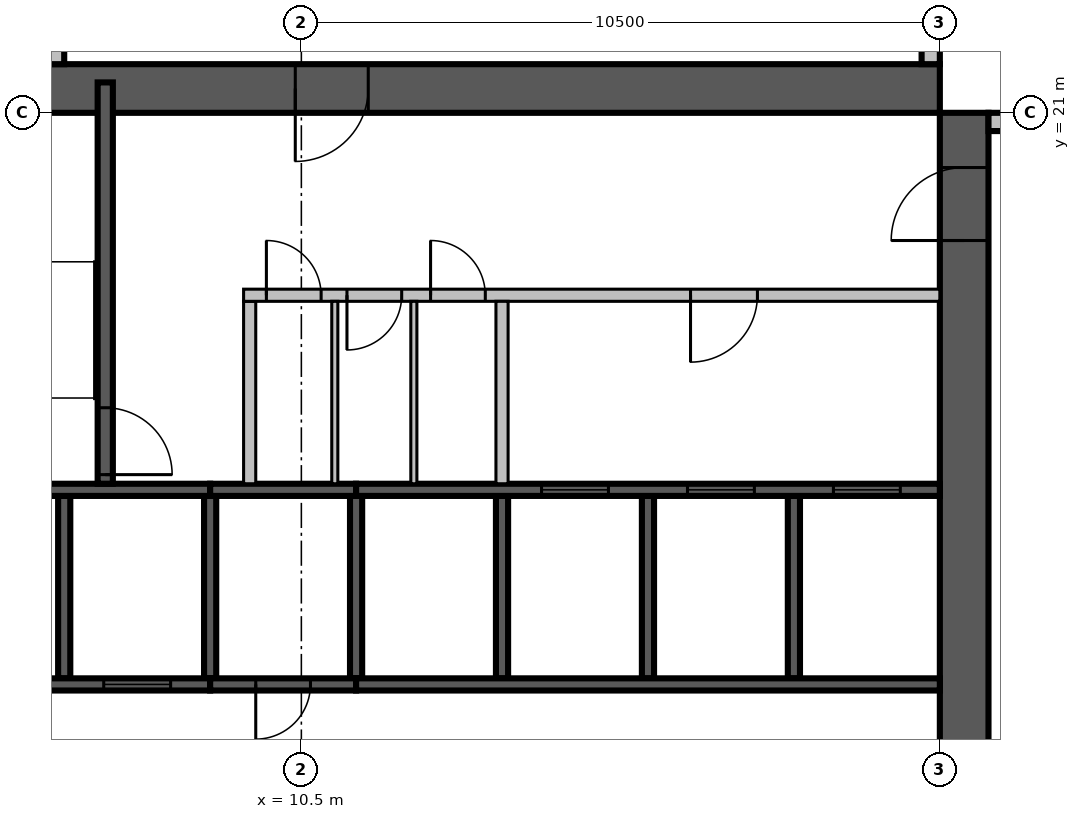
"""IFC4 building model, lengths in metres.
Left out: names, types, materials, properties, quantities, classifications, styles, units other than length and angle.
Written with IfcOpenShell. Run it as: python <this file> out.ifc"""

import sys

from ifc_helpers import new_model, si_unit, direction, frame, frame_2d, origin, place, context, subcontext, project, spatial, rectangle, extrude, source, transform, mapped, element, fill, save


model = new_model("IFC4")
c1 = context("Model", 3, precision=1e-05, world=origin(), true_north=direction((0.0, 1.0)))
c2 = subcontext(c1, "Body", "Model", "MODEL_VIEW")
j1 = project(units=[si_unit("LENGTHUNIT", "METRE"), si_unit("PLANEANGLEUNIT", "RADIAN")], contexts=[c1])
p1 = place(None, origin())
s1 = spatial("IfcSite", under=j1, at=p1, CompositionType="ELEMENT")
p2 = place(p1, origin())
s2 = spatial("IfcBuilding", under=s1, at=p2, CompositionType="ELEMENT")
p3 = place(p2, frame((0.0, 0.0, 215.8)))
s3 = spatial("IfcBuildingStorey", under=s2, at=p3, CompositionType="ELEMENT", Elevation=215.8)
m1 = source(origin(), c2, "Body", "SweptSolid", [
    extrude(rectangle(XDim=16.8, YDim=0.8, at=frame_2d((8.4, 0.0))), origin(), (0.0, 0.0, 1.0), 3.8),
])
p4 = place(p3, frame((21.4, 4.2, 0.0), z_axis=(0.0, 0.0, 1.0), x_axis=(0.0, 1.0, 0.0)))
e1 = element("IfcWall", 1, at=p4, inside=s3, PredefinedType="SHEAR", context=c2, shape_type="MappedRepresentation", body=[
    mapped(m1, transform((0.0, 0.0, 0.0), scale=1.0)),
])
m2 = source(origin(), c2, "Body", "SweptSolid", [
    extrude(rectangle(XDim=2.2, YDim=2.1, at=frame_2d((1.1, 1.05))), frame((0.0, 0.41, 0.0), z_axis=(0.0, -1.0, 0.0), x_axis=(1.0, 0.0, 0.0)), (0.0, 0.0, 1.0), 0.82),
])
p5 = place(p4, frame((4.2, 0.0, 0.0)))
e2 = element("IfcOpeningElement", 2, at=p5, cuts=e1, PredefinedType="OPENING", context=c2, shape_type="MappedRepresentation", body=[
    mapped(m2, transform((0.0, 0.0, 0.0), scale=1.0)),
])
m3 = source(origin(), c2, "Body", "SweptSolid", [
    extrude(rectangle(XDim=1.2, YDim=2.1, at=frame_2d((0.6, 1.05))), frame((0.0, 0.41, 0.0), z_axis=(0.0, -1.0, 0.0), x_axis=(1.0, 0.0, 0.0)), (0.0, 0.0, 1.0), 0.82),
])
p6 = place(p4, frame((14.7, 0.0, 0.0)))
e3 = element("IfcOpeningElement", 3, at=p6, cuts=e1, PredefinedType="OPENING", context=c2, shape_type="MappedRepresentation", body=[
    mapped(m3, transform((0.0, 0.0, 0.0), scale=1.0)),
])
p7 = place(p3, frame((4.2, 21.4, 0.0), z_axis=(0.0, 0.0, 1.0), x_axis=(1.0, 0.0, 0.0)))
e4 = element("IfcWall", 4, at=p7, inside=s3, PredefinedType="SHEAR", context=c2, shape_type="MappedRepresentation", body=[
    mapped(m1, transform((0.0, 0.0, 0.0), scale=1.0)),
])
p8 = place(p7, frame((6.2, 0.0, 0.0)))
e5 = element("IfcOpeningElement", 5, at=p8, cuts=e4, PredefinedType="OPENING", context=c2, shape_type="MappedRepresentation", body=[
    mapped(m3, transform((0.0, 0.0, 0.0), scale=1.0)),
])
m4 = source(origin(), c2, "Body", "SweptSolid", [
    extrude(rectangle(XDim=7.15, YDim=0.3, at=frame_2d((3.575, 0.0))), origin(), (0.0, 0.0, 1.0), 3.4),
])
p9 = place(p3, frame((28.95, 20.85, 0.0), z_axis=(0.0, 0.0, 1.0), x_axis=(-1.0, 0.0, 0.0)))
e6 = element("IfcWall", 6, at=p9, inside=s3, PredefinedType="STANDARD", context=c2, shape_type="MappedRepresentation", body=[
    mapped(m4, transform((0.0, 0.0, 0.0), scale=1.0)),
])
m5 = source(origin(), c2, "Body", "SweptSolid", [
    extrude(rectangle(XDim=3.0, YDim=2.3, at=frame_2d((1.5, 1.15))), frame((0.0, 0.16, 0.0), z_axis=(0.0, -1.0, 0.0), x_axis=(1.0, 0.0, 0.0)), (0.0, 0.0, 1.0), 0.32),
])
p10 = place(p9, frame((0.15, 0.0, 0.6)))
e7 = element("IfcOpeningElement", 7, at=p10, cuts=e6, PredefinedType="OPENING", context=c2, shape_type="MappedRepresentation", body=[
    mapped(m5, transform((0.0, 0.0, 0.0), scale=1.0)),
])
m6 = source(origin(), c2, "Body", "SweptSolid", [
    extrude(rectangle(XDim=1.8, YDim=2.3, at=frame_2d((0.9, 1.15))), frame((0.0, 0.16, 0.0), z_axis=(0.0, -1.0, 0.0), x_axis=(1.0, 0.0, 0.0)), (0.0, 0.0, 1.0), 0.32),
])
p11 = place(p9, frame((4.95, 0.0, 0.6)))
e8 = element("IfcOpeningElement", 8, at=p11, cuts=e6, PredefinedType="OPENING", context=c2, shape_type="MappedRepresentation", body=[
    mapped(m6, transform((0.0, 0.0, 0.0), scale=1.0)),
])
p12 = place(p3, frame((20.85, 21.8, 0.0), z_axis=(0.0, 0.0, 1.0), x_axis=(0.0, 1.0, 0.0)))
e9 = element("IfcWall", 9, at=p12, inside=s3, PredefinedType="STANDARD", context=c2, shape_type="MappedRepresentation", body=[
    mapped(m4, transform((0.0, 0.0, 0.0), scale=1.0)),
])
p13 = place(p12, frame((0.4, 0.0, 0.6)))
e10 = element("IfcOpeningElement", 10, at=p13, cuts=e9, PredefinedType="OPENING", context=c2, shape_type="MappedRepresentation", body=[
    mapped(m6, transform((0.0, 0.0, 0.0), scale=1.0)),
])
m7 = source(origin(), c2, "Body", "SweptSolid", [
    extrude(rectangle(XDim=1.0, YDim=2.1, at=frame_2d((0.5, 1.05))), frame((0.0, 0.16, 0.0), z_axis=(0.0, -1.0, 0.0), x_axis=(1.0, 0.0, 0.0)), (0.0, 0.0, 1.0), 0.32),
])
p14 = place(p12, frame((5.0, 0.0, 0.0)))
e11 = element("IfcOpeningElement", 11, at=p14, cuts=e9, PredefinedType="OPENING", context=c2, shape_type="MappedRepresentation", body=[
    mapped(m7, transform((0.0, 0.0, 0.0), scale=1.0)),
])
m8 = source(origin(), c2, "Body", "SweptSolid", [
    extrude(rectangle(XDim=16.6, YDim=0.3, at=frame_2d((8.3, 0.0))), origin(), (0.0, 0.0, 1.0), 2.9),
])
p15 = place(p3, frame((6.45, 38.4, 0.0), z_axis=(0.0, 0.0, 1.0), x_axis=(0.0, -1.0, 0.0)))
e12 = element("IfcWall", 12, at=p15, inside=s3, PredefinedType="STANDARD", context=c2, shape_type="MappedRepresentation", body=[
    mapped(m8, transform((0.0, 0.0, 0.0), scale=1.0)),
])
p16 = place(p15, frame((1.15, 0.0, 0.6)))
e13 = element("IfcOpeningElement", 13, at=p16, cuts=e12, PredefinedType="OPENING", context=c2, shape_type="MappedRepresentation", body=[
    mapped(m6, transform((0.0, 0.0, 0.0), scale=1.0)),
])
p17 = place(p15, frame((5.162, 0.0, 0.6)))
e14 = element("IfcOpeningElement", 14, at=p17, cuts=e12, PredefinedType="OPENING", context=c2, shape_type="MappedRepresentation", body=[
    mapped(m6, transform((0.0, 0.0, 0.0), scale=1.0)),
])
p18 = place(p15, frame((9.438, 0.0, 0.6)))
e15 = element("IfcOpeningElement", 15, at=p18, cuts=e12, PredefinedType="OPENING", context=c2, shape_type="MappedRepresentation", body=[
    mapped(m6, transform((0.0, 0.0, 0.0), scale=1.0)),
])
m9 = source(origin(), c2, "Body", "SweptSolid", [
    extrude(rectangle(XDim=1.2, YDim=2.3, at=frame_2d((0.6, 1.15))), frame((0.0, 0.16, 0.0), z_axis=(0.0, -1.0, 0.0), x_axis=(1.0, 0.0, 0.0)), (0.0, 0.0, 1.0), 0.32),
])
p19 = place(p15, frame((14.338, 0.0, 0.6)))
e16 = element("IfcOpeningElement", 16, at=p19, cuts=e12, PredefinedType="OPENING", context=c2, shape_type="MappedRepresentation", body=[
    mapped(m9, transform((0.0, 0.0, 0.0), scale=1.0)),
])
p20 = place(p15, frame((11.887, 0.0, 0.6)))
e17 = element("IfcOpeningElement", 17, at=p20, cuts=e12, PredefinedType="OPENING", context=c2, shape_type="MappedRepresentation", body=[
    mapped(m6, transform((0.0, 0.0, 0.0), scale=1.0)),
])
m10 = source(origin(), c2, "Body", "SweptSolid", [
    extrude(rectangle(XDim=3.0, YDim=0.2, at=frame_2d((1.5, 0.0))), origin(), (0.0, 0.0, 1.0), 3.8),
])
p21 = place(p3, frame((6.6, 11.7, 0.0), z_axis=(0.0, 0.0, 1.0), x_axis=(0.0, 1.0, 0.0)))
e18 = element("IfcWall", 18, at=p21, inside=s3, PredefinedType="SOLIDWALL", context=c2, shape_type="MappedRepresentation", body=[
    mapped(m10, transform((0.0, 0.0, 0.0), scale=1.0)),
])
m11 = source(origin(), c2, "Body", "SweptSolid", [
    extrude(rectangle(XDim=3.0, YDim=0.2, at=frame_2d((1.5, 0.0))), origin(), (0.0, 0.0, 1.0), 3.4),
])
for number, where, z_axis, x_axis in (
    (19, (9.0, 11.7, 0.0), (0.0, 0.0, 1.0), (0.0, 1.0, 0.0)),
    (20, (11.4, 11.7, 0.0), (0.0, 0.0, 1.0), (0.0, 1.0, 0.0)),
):
    element("IfcWall", number, at=place(p3, frame(where, z_axis=z_axis, x_axis=x_axis)), inside=s3, PredefinedType="SOLIDWALL", context=c2, shape_type="MappedRepresentation", body=[
        mapped(m11, transform((0.0, 0.0, 0.0), scale=1.0)),
    ])
for number, where, z_axis, x_axis in (
    (21, (13.8, 11.7, 0.0), (0.0, 0.0, 1.0), (0.0, 1.0, 0.0)),
    (22, (16.2, 11.7, 0.0), (0.0, 0.0, 1.0), (0.0, 1.0, 0.0)),
    (23, (18.6, 11.7, 0.0), (0.0, 0.0, 1.0), (0.0, 1.0, 0.0)),
):
    element("IfcWall", number, at=place(p3, frame(where, z_axis=z_axis, x_axis=x_axis)), inside=s3, PredefinedType="SOLIDWALL", context=c2, shape_type="MappedRepresentation", body=[
        mapped(m10, transform((0.0, 0.0, 0.0), scale=1.0)),
    ])
m12 = source(origin(), c2, "Body", "SweptSolid", [
    extrude(rectangle(XDim=4.8, YDim=0.2, at=frame_2d((2.4, 0.0))), origin(), (0.0, 0.0, 1.0), 3.8),
])
p22 = place(p3, frame((4.2, 11.6, 0.0), z_axis=(0.0, 0.0, 1.0), x_axis=(1.0, 0.0, 0.0)))
e24 = element("IfcWall", 24, at=p22, inside=s3, PredefinedType="SOLIDWALL", context=c2, shape_type="MappedRepresentation", body=[
    mapped(m12, transform((0.0, 0.0, 0.0), scale=1.0)),
])
m13 = source(origin(), c2, "Body", "SweptSolid", [
    extrude(rectangle(XDim=1.1, YDim=2.1, at=frame_2d((0.55, 1.05))), frame((0.0, 0.11, 0.0), z_axis=(0.0, -1.0, 0.0), x_axis=(1.0, 0.0, 0.0)), (0.0, 0.0, 1.0), 0.22),
])
p23 = place(p22, frame((0.65, 0.0, 0.0)))
e25 = element("IfcOpeningElement", 25, at=p23, cuts=e24, PredefinedType="OPENING", context=c2, shape_type="MappedRepresentation", body=[
    mapped(m13, transform((0.0, 0.0, 0.0), scale=1.0)),
])
p24 = place(p22, frame((3.05, 0.0, 0.0)))
e26 = element("IfcOpeningElement", 26, at=p24, cuts=e24, PredefinedType="OPENING", context=c2, shape_type="MappedRepresentation", body=[
    mapped(m13, transform((0.0, 0.0, 0.0), scale=1.0)),
])
m14 = source(origin(), c2, "Body", "SweptSolid", [
    extrude(rectangle(XDim=2.4, YDim=0.2, at=frame_2d((1.2, 0.0))), origin(), (0.0, 0.0, 1.0), 3.4),
])
p25 = place(p3, frame((9.0, 11.6, 0.0), z_axis=(0.0, 0.0, 1.0), x_axis=(1.0, 0.0, 0.0)))
e27 = element("IfcWall", 27, at=p25, inside=s3, PredefinedType="SOLIDWALL", context=c2, shape_type="MappedRepresentation", body=[
    mapped(m14, transform((0.0, 0.0, 0.0), scale=1.0)),
])
m15 = source(origin(), c2, "Body", "SweptSolid", [
    extrude(rectangle(XDim=0.9, YDim=2.1, at=frame_2d((0.45, 1.05))), frame((0.0, 0.11, 0.0), z_axis=(0.0, -1.0, 0.0), x_axis=(1.0, 0.0, 0.0)), (0.0, 0.0, 1.0), 0.22),
])
p26 = place(p25, frame((0.75, 0.0, 0.0)))
e28 = element("IfcOpeningElement", 28, at=p26, cuts=e27, PredefinedType="OPENING", context=c2, shape_type="MappedRepresentation", body=[
    mapped(m15, transform((0.0, 0.0, 0.0), scale=1.0)),
])
m16 = source(origin(), c2, "Body", "SweptSolid", [
    extrude(rectangle(XDim=9.6, YDim=0.2, at=frame_2d((4.8, 0.0))), origin(), (0.0, 0.0, 1.0), 3.8),
])
p27 = place(p3, frame((11.4, 11.6, 0.0), z_axis=(0.0, 0.0, 1.0), x_axis=(1.0, 0.0, 0.0)))
e29 = element("IfcWall", 29, at=p27, inside=s3, PredefinedType="SOLIDWALL", context=c2, shape_type="MappedRepresentation", body=[
    mapped(m16, transform((0.0, 0.0, 0.0), scale=1.0)),
])
p28 = place(p3, frame((4.2, 14.8, 0.0), z_axis=(0.0, 0.0, 1.0), x_axis=(1.0, 0.0, 0.0)))
e30 = element("IfcWall", 30, at=p28, inside=s3, PredefinedType="SOLIDWALL", context=c2, shape_type="MappedRepresentation", body=[
    mapped(m12, transform((0.0, 0.0, 0.0), scale=1.0)),
])
p29 = place(p3, frame((9.0, 14.8, 0.0), z_axis=(0.0, 0.0, 1.0), x_axis=(1.0, 0.0, 0.0)))
e31 = element("IfcWall", 31, at=p29, inside=s3, PredefinedType="SOLIDWALL", context=c2, shape_type="MappedRepresentation", body=[
    mapped(m14, transform((0.0, 0.0, 0.0), scale=1.0)),
])
p30 = place(p3, frame((11.4, 14.8, 0.0), z_axis=(0.0, 0.0, 1.0), x_axis=(1.0, 0.0, 0.0)))
e32 = element("IfcWall", 32, at=p30, inside=s3, PredefinedType="SOLIDWALL", context=c2, shape_type="MappedRepresentation", body=[
    mapped(m16, transform((0.0, 0.0, 0.0), scale=1.0)),
])
p31 = place(p30, frame((3.05, 0.0, 0.0)))
e33 = element("IfcOpeningElement", 33, at=p31, cuts=e32, PredefinedType="OPENING", context=c2, shape_type="MappedRepresentation", body=[
    mapped(m13, transform((0.0, 0.0, 0.0), scale=1.0)),
])
p32 = place(p30, frame((5.45, 0.0, 0.0)))
e34 = element("IfcOpeningElement", 34, at=p32, cuts=e32, PredefinedType="OPENING", context=c2, shape_type="MappedRepresentation", body=[
    mapped(m13, transform((0.0, 0.0, 0.0), scale=1.0)),
])
p33 = place(p30, frame((7.85, 0.0, 0.0)))
e35 = element("IfcOpeningElement", 35, at=p33, cuts=e32, PredefinedType="OPENING", context=c2, shape_type="MappedRepresentation", body=[
    mapped(m13, transform((0.0, 0.0, 0.0), scale=1.0)),
])
m17 = source(origin(), c2, "Body", "SweptSolid", [
    extrude(rectangle(XDim=6.6, YDim=0.25, at=frame_2d((3.3, 0.0))), origin(), (0.0, 0.0, 1.0), 3.4),
])
p34 = place(p3, frame((7.275, 14.9, 0.0), z_axis=(0.0, 0.0, 1.0), x_axis=(0.0, 1.0, 0.0)))
e36 = element("IfcWall", 36, at=p34, inside=s3, PredefinedType="SOLIDWALL", context=c2, shape_type="MappedRepresentation", body=[
    mapped(m17, transform((0.0, 0.0, 0.0), scale=1.0)),
])
m18 = source(origin(), c2, "Body", "SweptSolid", [
    extrude(rectangle(XDim=1.1, YDim=2.1, at=frame_2d((0.55, 1.05))), frame((0.0, 0.135, 0.0), z_axis=(0.0, -1.0, 0.0), x_axis=(1.0, 0.0, 0.0)), (0.0, 0.0, 1.0), 0.27),
])
p35 = place(p34, frame((0.15, 0.0, 0.0)))
e37 = element("IfcOpeningElement", 37, at=p35, cuts=e36, PredefinedType="OPENING", context=c2, shape_type="MappedRepresentation", body=[
    mapped(m18, transform((0.0, 0.0, 0.0), scale=1.0)),
])
m19 = source(origin(), c2, "Body", "SweptSolid", [
    extrude(rectangle(XDim=3.0, YDim=0.2, at=frame_2d((1.5, 0.0))), origin(), (0.0, 0.0, 1.0), 3.4),
])
p36 = place(p3, frame((9.65, 14.9, 0.0), z_axis=(0.0, 0.0, 1.0), x_axis=(0.0, 1.0, 0.0)))
e38 = element("IfcWall", 38, at=p36, inside=s3, PredefinedType="PARTITIONING", context=c2, shape_type="MappedRepresentation", body=[
    mapped(m19, transform((0.0, 0.0, 0.0), scale=1.0)),
])
m20 = source(origin(), c2, "Body", "SweptSolid", [
    extrude(rectangle(XDim=11.45, YDim=0.2, at=frame_2d((5.725, 0.0))), origin(), (0.0, 0.0, 1.0), 3.4),
])
p37 = place(p3, frame((9.55, 18.0, 0.0), z_axis=(0.0, 0.0, 1.0), x_axis=(1.0, 0.0, 0.0)))
e39 = element("IfcWall", 39, at=p37, inside=s3, PredefinedType="PARTITIONING", context=c2, shape_type="MappedRepresentation", body=[
    mapped(m20, transform((0.0, 0.0, 0.0), scale=1.0)),
])
p38 = place(p37, frame((0.375, 0.0, 0.0)))
e40 = element("IfcOpeningElement", 40, at=p38, cuts=e39, PredefinedType="OPENING", context=c2, shape_type="MappedRepresentation", body=[
    mapped(m15, transform((0.0, 0.0, 0.0), scale=1.0)),
])
p39 = place(p37, frame((1.7, 0.0, 0.0)))
e41 = element("IfcOpeningElement", 41, at=p39, cuts=e39, PredefinedType="OPENING", context=c2, shape_type="MappedRepresentation", body=[
    mapped(m15, transform((0.0, 0.0, 0.0), scale=1.0)),
])
p40 = place(p37, frame((3.075, 0.0, 0.0)))
e42 = element("IfcOpeningElement", 42, at=p40, cuts=e39, PredefinedType="OPENING", context=c2, shape_type="MappedRepresentation", body=[
    mapped(m15, transform((0.0, 0.0, 0.0), scale=1.0)),
])
p41 = place(p37, frame((7.35, 0.0, 0.0)))
e43 = element("IfcOpeningElement", 43, at=p41, cuts=e39, PredefinedType="OPENING", context=c2, shape_type="MappedRepresentation", body=[
    mapped(m13, transform((0.0, 0.0, 0.0), scale=1.0)),
])
p42 = place(p3, frame((13.8, 14.9, 0.0), z_axis=(0.0, 0.0, 1.0), x_axis=(0.0, 1.0, 0.0)))
e44 = element("IfcWall", 44, at=p42, inside=s3, PredefinedType="PARTITIONING", context=c2, shape_type="MappedRepresentation", body=[
    mapped(m19, transform((0.0, 0.0, 0.0), scale=1.0)),
])
m21 = source(origin(), c2, "Body", "SweptSolid", [
    extrude(rectangle(XDim=3.0, YDim=0.1, at=frame_2d((1.5, 0.0))), origin(), (0.0, 0.0, 1.0), 3.4),
])
for number, where, z_axis, x_axis in (
    (45, (11.05, 14.9, 0.0), (0.0, 0.0, 1.0), (0.0, 1.0, 0.0)),
    (46, (12.35, 14.9, 0.0), (0.0, 0.0, 1.0), (0.0, 1.0, 0.0)),
):
    element("IfcWall", number, at=place(p3, frame(where, z_axis=z_axis, x_axis=x_axis)), inside=s3, PredefinedType="PARTITIONING", context=c2, shape_type="MappedRepresentation", body=[
        mapped(m21, transform((0.0, 0.0, 0.0), scale=1.0)),
    ])
m22 = source(origin(), c2, "Body", "SweptSolid", [
    extrude(rectangle(XDim=1.1, YDim=2.1, at=frame_2d((0.55, 1.05))), frame((0.0, 0.025, 0.0), z_axis=(0.0, -1.0, 0.0), x_axis=(1.0, 0.0, 0.0)), (0.0, 0.0, 1.0), 0.05),
])
p43 = place(p24, origin())
e47 = element("IfcDoor", 47, at=p43, inside=s3, OperationType="SLIDING_TO_LEFT", PredefinedType="DOOR", context=c2, shape_type="MappedRepresentation", body=[
    mapped(m22, transform((0.0, 0.0, 0.0), scale=1.0)),
])
fill(e26, e47)
m23 = source(origin(), c2, "Body", "SweptSolid", [
    extrude(rectangle(XDim=0.9, YDim=2.1, at=frame_2d((0.45, 1.05))), frame((0.0, 0.025, 0.0), z_axis=(0.0, -1.0, 0.0), x_axis=(1.0, 0.0, 0.0)), (0.0, 0.0, 1.0), 0.05),
])
p44 = place(p26, origin())
e48 = element("IfcDoor", 48, at=p44, inside=s3, OperationType="SINGLE_SWING_RIGHT", PredefinedType="DOOR", context=c2, shape_type="MappedRepresentation", body=[
    mapped(m23, transform((0.0, 0.0, 0.0), scale=1.0)),
])
fill(e28, e48)
p45 = place(p31, origin())
e49 = element("IfcDoor", 49, at=p45, inside=s3, OperationType="SLIDING_TO_LEFT", PredefinedType="DOOR", context=c2, shape_type="MappedRepresentation", body=[
    mapped(m22, transform((0.0, 0.0, 0.0), scale=1.0)),
])
fill(e33, e49)
p46 = place(p32, origin())
e50 = element("IfcDoor", 50, at=p46, inside=s3, OperationType="SLIDING_TO_LEFT", PredefinedType="DOOR", context=c2, shape_type="MappedRepresentation", body=[
    mapped(m22, transform((0.0, 0.0, 0.0), scale=1.0)),
])
fill(e34, e50)
p47 = place(p33, origin())
e51 = element("IfcDoor", 51, at=p47, inside=s3, OperationType="SLIDING_TO_LEFT", PredefinedType="DOOR", context=c2, shape_type="MappedRepresentation", body=[
    mapped(m22, transform((0.0, 0.0, 0.0), scale=1.0)),
])
fill(e35, e51)
p48 = place(p35, origin())
e52 = element("IfcDoor", 52, at=p48, inside=s3, OperationType="SINGLE_SWING_RIGHT", PredefinedType="DOOR", context=c2, shape_type="MappedRepresentation", body=[
    mapped(m22, transform((0.0, 0.0, 0.0), scale=1.0)),
])
fill(e37, e52)
p49 = place(p38, origin())
e53 = element("IfcDoor", 53, at=p49, inside=s3, OperationType="SINGLE_SWING_LEFT", PredefinedType="DOOR", context=c2, shape_type="MappedRepresentation", body=[
    mapped(m23, transform((0.0, 0.0, 0.0), scale=1.0)),
])
fill(e40, e53)
p50 = place(p39, origin())
e54 = element("IfcDoor", 54, at=p50, inside=s3, OperationType="SINGLE_SWING_RIGHT", PredefinedType="DOOR", context=c2, shape_type="MappedRepresentation", body=[
    mapped(m23, transform((0.0, 0.0, 0.0), scale=1.0)),
])
fill(e41, e54)
p51 = place(p40, origin())
e55 = element("IfcDoor", 55, at=p51, inside=s3, OperationType="SINGLE_SWING_LEFT", PredefinedType="DOOR", context=c2, shape_type="MappedRepresentation", body=[
    mapped(m23, transform((0.0, 0.0, 0.0), scale=1.0)),
])
fill(e42, e55)
p52 = place(p41, origin())
e56 = element("IfcDoor", 56, at=p52, inside=s3, OperationType="SINGLE_SWING_RIGHT", PredefinedType="DOOR", context=c2, shape_type="MappedRepresentation", body=[
    mapped(m22, transform((0.0, 0.0, 0.0), scale=1.0)),
])
fill(e43, e56)
m24 = source(origin(), c2, "Body", "SweptSolid", [
    extrude(rectangle(XDim=1.2, YDim=2.1, at=frame_2d((0.6, 1.05))), frame((0.0, 0.025, 0.0), z_axis=(0.0, -1.0, 0.0), x_axis=(1.0, 0.0, 0.0)), (0.0, 0.0, 1.0), 0.05),
])
p53 = place(p8, origin())
e57 = element("IfcDoor", 57, at=p53, inside=s3, OperationType="SINGLE_SWING_RIGHT", PredefinedType="DOOR", context=c2, shape_type="MappedRepresentation", body=[
    mapped(m24, transform((0.0, 0.0, 0.0), scale=1.0)),
])
fill(e5, e57)
p54 = place(p6, origin())
e58 = element("IfcDoor", 58, at=p54, inside=s3, OperationType="SINGLE_SWING_LEFT", PredefinedType="DOOR", context=c2, shape_type="MappedRepresentation", body=[
    mapped(m24, transform((0.0, 0.0, 0.0), scale=1.0)),
])
fill(e3, e58)
save(model, sys.argv[1])
